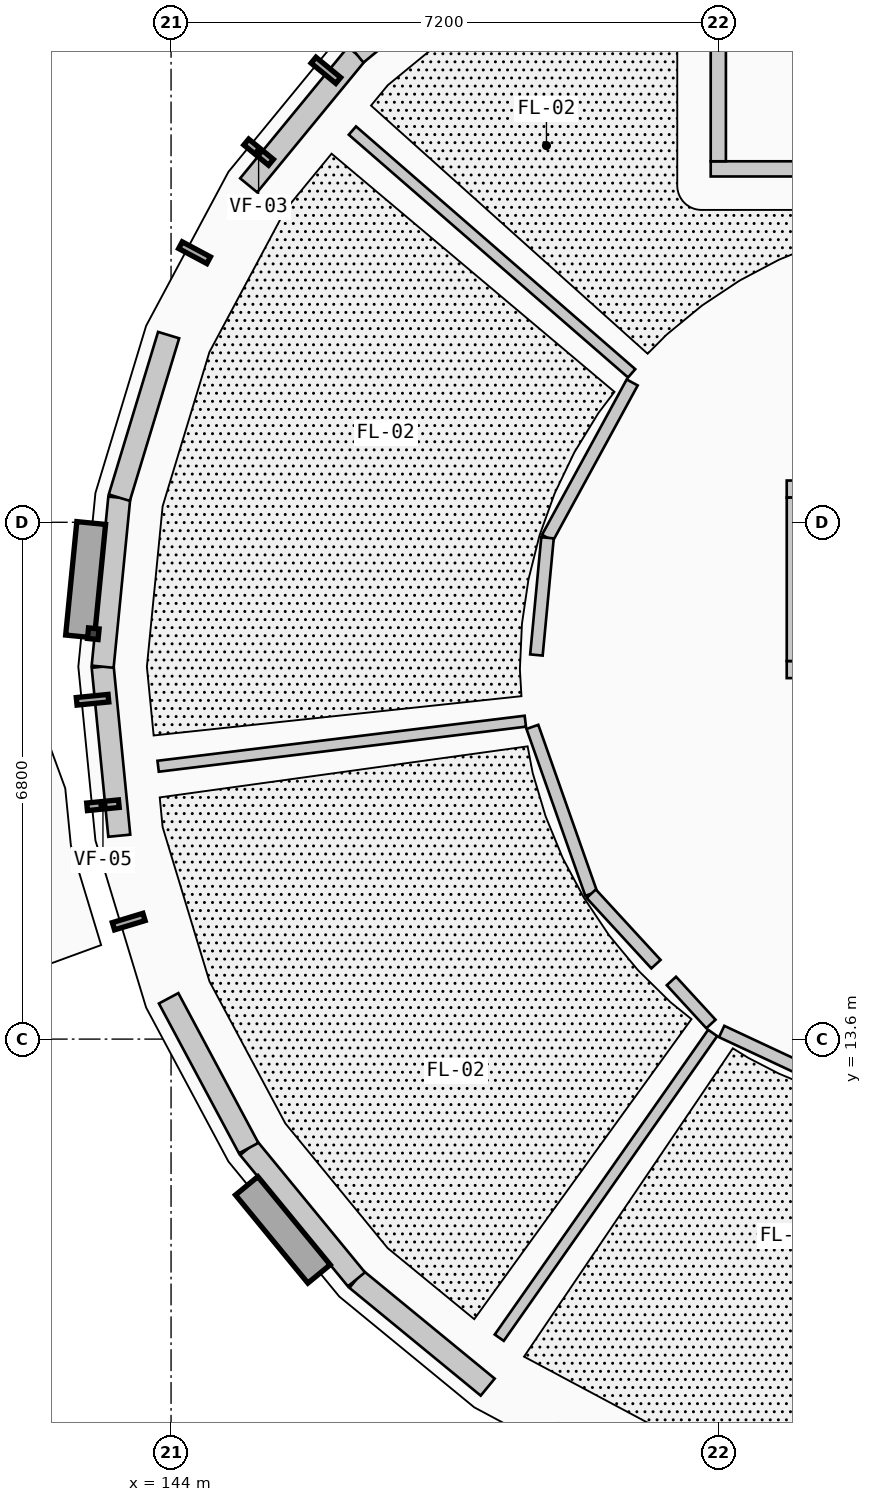
"""IFC4 building model, lengths in metres.
Left out: names, types, materials, properties, quantities, classifications, styles, units other than length and angle.
Written with IfcOpenShell. Run it as: python <this file> out.ifc"""

import sys

from ifc_helpers import new_model, si_unit, direction, frame, frame_2d, origin, origin_2d, place, context, subcontext, project, spatial, rectangle, extrude, element, fill, save


model = new_model("IFC4")
c1 = context("Model", 3, precision=1e-05, world=origin(), true_north=direction((0.0, 1.0)))
c2 = subcontext(c1, "Body", "Model", "MODEL_VIEW")
j1 = project(units=[si_unit("LENGTHUNIT", "METRE"), si_unit("PLANEANGLEUNIT", "RADIAN")], contexts=[c1])
p1 = place(None, origin())
s1 = spatial("IfcSite", under=j1, at=p1, CompositionType="ELEMENT")
p2 = place(p1, origin())
s2 = spatial("IfcBuilding", under=s1, at=p2, CompositionType="ELEMENT")
p3 = place(p2, frame((0.0, 0.0, 4.55)))
s3 = spatial("IfcBuildingStorey", under=s2, at=p3, CompositionType="ELEMENT", Elevation=4.55)
for number, where, z_axis, x_axis in (
    (1, (146.807, 26.193, 0.0), (0.0, 0.0, 1.0), (1.0, 0.0, 0.0)),
    (2, (144.448, 22.664, 0.0), (0.0, 0.0, 1.0), (1.0, 0.0, 0.0)),
    (3, (143.62, 18.5, 0.0), (0.0, 0.0, 1.0), (1.0, 0.0, 0.0)),
    (4, (144.448, 14.336, 0.0), (0.0, 0.0, 1.0), (1.0, 0.0, 0.0)),
    (5, (146.807, 10.807, 0.0), (0.0, 0.0, 1.0), (1.0, 0.0, 0.0)),
    (6, (150.336, 8.448, 0.0), (0.0, 0.0, 1.0), (1.0, 0.0, 0.0)),
    (7, (150.399, 22.601, 0.0), (0.0, 0.0, 1.0), (1.0, 0.0, 0.0)),
    (8, (148.7, 18.5, 0.0), (0.0, 0.0, 1.0), (1.0, 0.0, 0.0)),
    (9, (150.399, 14.399, 0.0), (0.0, 0.0, 1.0), (1.0, 0.0, 0.0)),
):
    element("IfcColumn", number, at=place(p3, frame(where, z_axis=z_axis, x_axis=x_axis)), inside=s3, PredefinedType="COLUMN", context=c2, shape_type="SweptSolid", body=[
        extrude(rectangle(XDim=0.365, YDim=0.365, at=origin_2d()), origin(), (0.0, 0.0, 1.0), 4.2),
    ])
p4 = place(p3, frame((148.166, 9.021, 0.0), z_axis=(0.0, 0.0, 1.0), x_axis=(-0.772875513354, 0.63455767339, 0.0)))
e10 = element("IfcWall", 10, at=p4, inside=s3, PredefinedType="ELEMENTEDWALL", context=c2, shape_type="SweptSolid", body=[
    extrude(rectangle(XDim=2.235, YDim=0.29, at=frame_2d((1.117, 0.0))), origin(), (0.0, 0.0, 1.0), 3.309),
])
p5 = place(p4, frame((0.317, 0.0, 0.85)))
e11 = element("IfcOpeningElement", 11, at=p5, cuts=e10, PredefinedType="OPENING", context=c2, shape_type="SweptSolid", body=[
    extrude(rectangle(XDim=1.6, YDim=1.85, at=frame_2d((0.8, 0.925))), frame((0.0, 0.155, 0.0), z_axis=(0.0, -1.0, 0.0), x_axis=(1.0, 0.0, 0.0)), (0.0, 0.0, 1.0), 0.31),
])
p6 = place(p3, frame((146.439, 10.439, 0.0), z_axis=(0.0, 0.0, 1.0), x_axis=(-0.63455767339, 0.772875513354, 0.0)))
e12 = element("IfcWall", 12, at=p6, inside=s3, PredefinedType="ELEMENTEDWALL", context=c2, shape_type="SweptSolid", body=[
    extrude(rectangle(XDim=2.235, YDim=0.29, at=frame_2d((1.117, 0.0))), origin(), (0.0, 0.0, 1.0), 3.309),
])
p7 = place(p6, frame((0.707, 0.0, 0.85)))
e13 = element("IfcOpeningElement", 13, at=p7, cuts=e12, PredefinedType="OPENING", context=c2, shape_type="SweptSolid", body=[
    extrude(rectangle(XDim=0.82, YDim=1.45, at=frame_2d((0.41, 0.725))), frame((0.0, 0.155, 0.0), z_axis=(0.0, -1.0, 0.0), x_axis=(1.0, 0.0, 0.0)), (0.0, 0.0, 1.0), 0.31),
])
p8 = place(p3, frame((145.021, 12.166, 0.0), z_axis=(0.0, 0.0, 1.0), x_axis=(-0.471217561446, 0.882017012185, 0.0)))
e14 = element("IfcWall", 14, at=p8, inside=s3, PredefinedType="ELEMENTEDWALL", context=c2, shape_type="SweptSolid", body=[
    extrude(rectangle(XDim=2.235, YDim=0.29, at=frame_2d((1.117, 0.0))), origin(), (0.0, 0.0, 1.0), 3.309),
])
p9 = place(p8, frame((0.692, 0.0, 0.85)))
e15 = element("IfcOpeningElement", 15, at=p9, cuts=e14, PredefinedType="OPENING", context=c2, shape_type="SweptSolid", body=[
    extrude(rectangle(XDim=0.85, YDim=1.5, at=frame_2d((0.425, 0.75))), frame((0.0, 0.155, 0.0), z_axis=(0.0, -1.0, 0.0), x_axis=(1.0, 0.0, 0.0)), (0.0, 0.0, 1.0), 0.31),
])
p10 = place(p3, frame((143.319, 16.276, 0.0), z_axis=(0.0, 0.0, 1.0), x_axis=(-0.097989369151, 0.995187461503, 0.0)))
e16 = element("IfcWall", 16, at=p10, inside=s3, PredefinedType="ELEMENTEDWALL", context=c2, shape_type="SweptSolid", body=[
    extrude(rectangle(XDim=2.235, YDim=0.29, at=frame_2d((1.117, 0.0))), origin(), (0.0, 0.0, 1.0), 3.309),
])
p11 = place(p10, frame((0.692, 0.0, 0.85)))
e17 = element("IfcOpeningElement", 17, at=p11, cuts=e16, PredefinedType="OPENING", context=c2, shape_type="SweptSolid", body=[
    extrude(rectangle(XDim=0.85, YDim=1.75, at=frame_2d((0.425, 0.875))), frame((0.0, 0.155, 0.0), z_axis=(0.0, -1.0, 0.0), x_axis=(1.0, 0.0, 0.0)), (0.0, 0.0, 1.0), 0.31),
])
p12 = place(p3, frame((143.1, 18.5, 0.0), z_axis=(0.0, 0.0, 1.0), x_axis=(0.097989369151, 0.995187461503, 0.0)))
e18 = element("IfcWall", 18, at=p12, inside=s3, PredefinedType="ELEMENTEDWALL", context=c2, shape_type="SweptSolid", body=[
    extrude(rectangle(XDim=2.235, YDim=0.29, at=frame_2d((1.117, 0.0))), origin(), (0.0, 0.0, 1.0), 3.309),
])
p13 = place(p12, frame((0.677, 0.0, 0.85)))
e19 = element("IfcOpeningElement", 19, at=p13, cuts=e18, PredefinedType="OPENING", context=c2, shape_type="SweptSolid", body=[
    extrude(rectangle(XDim=0.88, YDim=1.6, at=frame_2d((0.44, 0.8))), frame((0.0, 0.155, 0.0), z_axis=(0.0, -1.0, 0.0), x_axis=(1.0, 0.0, 0.0)), (0.0, 0.0, 1.0), 0.31),
])
p14 = place(p3, frame((143.319, 20.724, 0.0), z_axis=(0.0, 0.0, 1.0), x_axis=(0.290322655883, 0.956928814218, 0.0)))
e20 = element("IfcWall", 20, at=p14, inside=s3, PredefinedType="ELEMENTEDWALL", context=c2, shape_type="SweptSolid", body=[
    extrude(rectangle(XDim=2.235, YDim=0.29, at=frame_2d((1.118, 0.0))), origin(), (0.0, 0.0, 1.0), 3.309),
])
p15 = place(p14, frame((0.668, 0.0, 0.85)))
e21 = element("IfcOpeningElement", 21, at=p15, cuts=e20, PredefinedType="OPENING", context=c2, shape_type="SweptSolid", body=[
    extrude(rectangle(XDim=0.9, YDim=1.4, at=frame_2d((0.45, 0.7))), frame((0.0, 0.155, 0.0), z_axis=(0.0, -1.0, 0.0), x_axis=(1.0, 0.0, 0.0)), (0.0, 0.0, 1.0), 0.31),
])
p16 = place(p3, frame((145.021, 24.834, 0.0), z_axis=(0.0, 0.0, 1.0), x_axis=(0.63455767339, 0.772875513354, 0.0)))
e22 = element("IfcWall", 22, at=p16, inside=s3, PredefinedType="ELEMENTEDWALL", context=c2, shape_type="SweptSolid", body=[
    extrude(rectangle(XDim=2.235, YDim=0.29, at=frame_2d((1.117, 0.0))), origin(), (0.0, 0.0, 1.0), 3.309),
])
p17 = place(p16, frame((0.667, 0.0, 0.85)))
e23 = element("IfcOpeningElement", 23, at=p17, cuts=e22, PredefinedType="OPENING", context=c2, shape_type="SweptSolid", body=[
    extrude(rectangle(XDim=0.9, YDim=1.65, at=frame_2d((0.45, 0.825))), frame((0.0, 0.155, 0.0), z_axis=(0.0, -1.0, 0.0), x_axis=(1.0, 0.0, 0.0)), (0.0, 0.0, 1.0), 0.31),
])
p18 = place(p3, frame((146.439, 26.561, 0.0), z_axis=(0.0, 0.0, 1.0), x_axis=(0.772875513354, 0.63455767339, 0.0)))
e24 = element("IfcWall", 24, at=p18, inside=s3, PredefinedType="ELEMENTEDWALL", context=c2, shape_type="SweptSolid", body=[
    extrude(rectangle(XDim=2.235, YDim=0.29, at=frame_2d((1.117, 0.0))), origin(), (0.0, 0.0, 1.0), 3.309),
])
p19 = place(p18, frame((0.667, 0.0, 0.85)))
e25 = element("IfcOpeningElement", 25, at=p19, cuts=e24, PredefinedType="OPENING", context=c2, shape_type="SweptSolid", body=[
    extrude(rectangle(XDim=0.9, YDim=1.9, at=frame_2d((0.45, 0.95))), frame((0.0, 0.155, 0.0), z_axis=(0.0, -1.0, 0.0), x_axis=(1.0, 0.0, 0.0)), (0.0, 0.0, 1.0), 0.31),
])
p20 = place(p3, frame((151.1, 25.05, 0.0), z_axis=(0.0, 0.0, 1.0), x_axis=(1.0, 0.0, 0.0)))
e26 = element("IfcWall", 26, at=p20, inside=s3, PredefinedType="SHEAR", context=c2, shape_type="SweptSolid", body=[
    extrude(rectangle(XDim=6.8, YDim=0.2, at=frame_2d((3.4, 0.0))), origin(), (0.0, 0.0, 1.0), 3.955),
])
p21 = place(p20, frame((0.38, 0.0, 0.0)))
e27 = element("IfcOpeningElement", 27, at=p21, cuts=e26, PredefinedType="OPENING", context=c2, shape_type="SweptSolid", body=[
    extrude(rectangle(XDim=1.05, YDim=2.15, at=frame_2d((0.525, 1.075))), frame((0.0, 0.11, 0.0), z_axis=(0.0, -1.0, 0.0), x_axis=(1.0, 0.0, 0.0)), (0.0, 0.0, 1.0), 0.22),
])
p22 = place(p3, frame((151.2, 25.15, 0.0), z_axis=(0.0, 0.0, 1.0), x_axis=(0.0, 1.0, 0.0)))
e28 = element("IfcWall", 28, at=p22, inside=s3, PredefinedType="SHEAR", context=c2, shape_type="SweptSolid", body=[
    extrude(rectangle(XDim=2.9, YDim=0.2, at=frame_2d((1.45, 0.0))), origin(), (0.0, 0.0, 1.0), 3.955),
])
p23 = place(p3, frame((152.1, 18.462, 0.0), z_axis=(0.0, 0.0, 1.0), x_axis=(1.0, 0.0, 0.0)))
e29 = element("IfcWall", 29, at=p23, inside=s3, PredefinedType="SHEAR", context=c2, shape_type="SweptSolid", body=[
    extrude(rectangle(XDim=3.1, YDim=0.225, at=frame_2d((1.55, 0.0))), origin(), (0.0, 0.0, 1.0), 3.955),
])
p24 = place(p23, frame((0.95, 0.0, 0.0)))
e30 = element("IfcOpeningElement", 30, at=p24, cuts=e29, PredefinedType="OPENING", context=c2, shape_type="SweptSolid", body=[
    extrude(rectangle(XDim=1.2, YDim=2.2, at=frame_2d((0.6, 1.1))), frame((0.0, 0.123, 0.0), z_axis=(0.0, -1.0, 0.0), x_axis=(1.0, 0.0, 0.0)), (0.0, 0.0, 1.0), 0.245),
])
p25 = place(p3, frame((152.1, 20.837, 0.0), z_axis=(0.0, 0.0, 1.0), x_axis=(1.0, 0.0, 0.0)))
e31 = element("IfcWall", 31, at=p25, inside=s3, PredefinedType="SHEAR", context=c2, shape_type="SweptSolid", body=[
    extrude(rectangle(XDim=3.1, YDim=0.225, at=frame_2d((1.55, 0.0))), origin(), (0.0, 0.0, 1.0), 3.955),
])
p26 = place(p3, frame((152.213, 18.575, 0.0), z_axis=(0.0, 0.0, 1.0), x_axis=(0.0, 1.0, 0.0)))
e32 = element("IfcWall", 32, at=p26, inside=s3, PredefinedType="SHEAR", context=c2, shape_type="SweptSolid", body=[
    extrude(rectangle(XDim=2.15, YDim=0.225, at=frame_2d((1.075, 0.0))), origin(), (0.0, 0.0, 1.0), 3.955),
])
p27 = place(p3, frame((150.06, 22.36, 0.0), z_axis=(0.0, 0.0, 1.0), x_axis=(-0.754707000712, 0.656061996366, 0.0)))
e33 = element("IfcWall", 33, at=p27, inside=s3, PredefinedType="PARTITIONING", context=c2, shape_type="SweptSolid", body=[
    extrude(rectangle(XDim=4.868, YDim=0.145, at=frame_2d((2.434, 0.0))), origin(), (0.0, 0.0, 1.0), 3.284),
])
p28 = place(p3, frame((148.661, 17.783, 0.0), z_axis=(0.0, 0.0, 1.0), x_axis=(-0.992549416304, -0.121842751918, 0.0)))
e34 = element("IfcWall", 34, at=p28, inside=s3, PredefinedType="PARTITIONING", context=c2, shape_type="SweptSolid", body=[
    extrude(rectangle(XDim=4.867, YDim=0.145, at=frame_2d((2.434, 0.0))), origin(), (0.0, 0.0, 1.0), 3.284),
])
p29 = place(p3, frame((151.126, 13.681, 0.0), z_axis=(0.0, 0.0, 1.0), x_axis=(-0.573579487823, -0.819149907617, 0.0)))
e35 = element("IfcWall", 35, at=p29, inside=s3, PredefinedType="PARTITIONING", context=c2, shape_type="SweptSolid", body=[
    extrude(rectangle(XDim=4.895, YDim=0.145, at=frame_2d((2.448, 0.0))), origin(), (0.0, 0.0, 1.0), 3.284),
])
p30 = place(p3, frame((150.067, 22.24, 0.0), z_axis=(0.0, 0.0, 1.0), x_axis=(-0.478565523384, -0.878051843474, 0.0)))
e36 = element("IfcWall", 36, at=p30, inside=s3, PredefinedType="PARTITIONING", context=c2, shape_type="SweptSolid", body=[
    extrude(rectangle(XDim=2.328, YDim=0.165, at=frame_2d((1.164, 0.0))), origin(), (0.0, 0.0, 1.0), 3.284),
])
p31 = place(p30, frame((0.579, 0.0, 0.0)))
e37 = element("IfcOpeningElement", 37, at=p31, cuts=e36, PredefinedType="OPENING", context=c2, shape_type="SweptSolid", body=[
    extrude(rectangle(XDim=1.17, YDim=2.24, at=frame_2d((0.585, 1.12))), frame((0.0, 0.093, 0.0), z_axis=(0.0, -1.0, 0.0), x_axis=(1.0, 0.0, 0.0)), (0.0, 0.0, 1.0), 0.185),
])
p32 = place(p3, frame((148.953, 20.196, 0.0), z_axis=(0.0, 0.0, 1.0), x_axis=(-0.094258636882, -0.995547743392, 0.0)))
e38 = element("IfcWall", 38, at=p32, inside=s3, PredefinedType="PARTITIONING", context=c2, shape_type="SweptSolid", body=[
    extrude(rectangle(XDim=1.549, YDim=0.165, at=frame_2d((0.774, 0.0))), origin(), (0.0, 0.0, 1.0), 3.284),
])
p33 = place(p3, frame((148.754, 17.708, 0.0), z_axis=(0.0, 0.0, 1.0), x_axis=(0.332606133603, -0.943065830093, 0.0)))
e39 = element("IfcWall", 39, at=p33, inside=s3, PredefinedType="PARTITIONING", context=c2, shape_type="SweptSolid", body=[
    extrude(rectangle(XDim=2.328, YDim=0.165, at=frame_2d((1.164, 0.0))), origin(), (0.0, 0.0, 1.0), 3.284),
])
p34 = place(p33, frame((0.569, 0.0, 0.0)))
e40 = element("IfcOpeningElement", 40, at=p34, cuts=e39, PredefinedType="OPENING", context=c2, shape_type="SweptSolid", body=[
    extrude(rectangle(XDim=1.19, YDim=2.26, at=frame_2d((0.595, 1.13))), frame((0.0, 0.093, 0.0), z_axis=(0.0, -1.0, 0.0), x_axis=(1.0, 0.0, 0.0)), (0.0, 0.0, 1.0), 0.185),
])
p35 = place(p3, frame((149.528, 15.513, 0.0), z_axis=(0.0, 0.0, 1.0), x_axis=(0.676611080709, -0.736340577085, 0.0)))
e41 = element("IfcWall", 41, at=p35, inside=s3, PredefinedType="PARTITIONING", context=c2, shape_type="SweptSolid", body=[
    extrude(rectangle(XDim=1.259, YDim=0.165, at=frame_2d((0.629, 0.0))), origin(), (0.0, 0.0, 1.0), 3.284),
])
p36 = place(p3, frame((150.583, 14.365, 0.0), z_axis=(0.0, 0.0, 1.0), x_axis=(0.676615979647, -0.736336075503, 0.0)))
e42 = element("IfcWall", 42, at=p36, inside=s3, PredefinedType="PARTITIONING", context=c2, shape_type="SweptSolid", body=[
    extrude(rectangle(XDim=0.769, YDim=0.165, at=frame_2d((0.384, 0.0))), origin(), (0.0, 0.0, 1.0), 3.284),
])
p37 = place(p3, frame((151.244, 13.7, 0.0), z_axis=(0.0, 0.0, 1.0), x_axis=(0.905838456469, -0.423623288763, 0.0)))
e43 = element("IfcWall", 43, at=p37, inside=s3, PredefinedType="PARTITIONING", context=c2, shape_type="SweptSolid", body=[
    extrude(rectangle(XDim=1.829, YDim=0.165, at=frame_2d((0.915, 0.0))), origin(), (0.0, 0.0, 1.0), 3.284),
])
p38 = place(p37, frame((0.31, 0.0, 0.0)))
e44 = element("IfcOpeningElement", 44, at=p38, cuts=e43, PredefinedType="OPENING", context=c2, shape_type="SweptSolid", body=[
    extrude(rectangle(XDim=1.21, YDim=2.16, at=frame_2d((0.605, 1.08))), frame((0.0, 0.093, 0.0), z_axis=(0.0, -1.0, 0.0), x_axis=(1.0, 0.0, 0.0)), (0.0, 0.0, 1.0), 0.185),
])
p39 = place(p5, origin())
e45 = element("IfcWindow", 45, at=p39, inside=s3, PartitioningType="SINGLE_PANEL", PredefinedType="WINDOW", context=c2, shape_type="SweptSolid", body=[
    extrude(rectangle(XDim=1.6, YDim=1.85, at=frame_2d((0.8, 0.925))), frame((0.0, 0.03, 0.0), z_axis=(0.0, -1.0, 0.0), x_axis=(1.0, 0.0, 0.0)), (0.0, 0.0, 1.0), 0.06),
])
fill(e11, e45)
p40 = place(p7, origin())
e46 = element("IfcWindow", 46, at=p40, inside=s3, PartitioningType="SINGLE_PANEL", PredefinedType="WINDOW", context=c2, shape_type="SweptSolid", body=[
    extrude(rectangle(XDim=0.82, YDim=1.45, at=frame_2d((0.41, 0.725))), frame((0.0, 0.03, 0.0), z_axis=(0.0, -1.0, 0.0), x_axis=(1.0, 0.0, 0.0)), (0.0, 0.0, 1.0), 0.06),
])
fill(e13, e46)
p41 = place(p9, origin())
e47 = element("IfcWindow", 47, at=p41, inside=s3, PartitioningType="SINGLE_PANEL", PredefinedType="WINDOW", context=c2, shape_type="SweptSolid", body=[
    extrude(rectangle(XDim=0.85, YDim=1.5, at=frame_2d((0.425, 0.75))), frame((0.0, 0.03, 0.0), z_axis=(0.0, -1.0, 0.0), x_axis=(1.0, 0.0, 0.0)), (0.0, 0.0, 1.0), 0.06),
])
fill(e15, e47)
p42 = place(p11, origin())
e48 = element("IfcWindow", 48, at=p42, inside=s3, PartitioningType="SINGLE_PANEL", PredefinedType="WINDOW", context=c2, shape_type="SweptSolid", body=[
    extrude(rectangle(XDim=0.85, YDim=1.75, at=frame_2d((0.425, 0.875))), frame((0.0, 0.03, 0.0), z_axis=(0.0, -1.0, 0.0), x_axis=(1.0, 0.0, 0.0)), (0.0, 0.0, 1.0), 0.06),
])
fill(e17, e48)
p43 = place(p13, origin())
e49 = element("IfcWindow", 49, at=p43, inside=s3, PartitioningType="SINGLE_PANEL", PredefinedType="WINDOW", context=c2, shape_type="SweptSolid", body=[
    extrude(rectangle(XDim=0.88, YDim=1.6, at=frame_2d((0.44, 0.8))), frame((0.0, 0.03, 0.0), z_axis=(0.0, -1.0, 0.0), x_axis=(1.0, 0.0, 0.0)), (0.0, 0.0, 1.0), 0.06),
])
fill(e19, e49)
p44 = place(p15, origin())
e50 = element("IfcWindow", 50, at=p44, inside=s3, PartitioningType="SINGLE_PANEL", PredefinedType="WINDOW", context=c2, shape_type="SweptSolid", body=[
    extrude(rectangle(XDim=0.9, YDim=1.4, at=frame_2d((0.45, 0.7))), frame((0.0, 0.03, 0.0), z_axis=(0.0, -1.0, 0.0), x_axis=(1.0, 0.0, 0.0)), (0.0, 0.0, 1.0), 0.06),
])
fill(e21, e50)
p45 = place(p17, origin())
e51 = element("IfcWindow", 51, at=p45, inside=s3, PartitioningType="SINGLE_PANEL", PredefinedType="WINDOW", context=c2, shape_type="SweptSolid", body=[
    extrude(rectangle(XDim=0.9, YDim=1.65, at=frame_2d((0.45, 0.825))), frame((0.0, 0.03, 0.0), z_axis=(0.0, -1.0, 0.0), x_axis=(1.0, 0.0, 0.0)), (0.0, 0.0, 1.0), 0.06),
])
fill(e23, e51)
p46 = place(p21, origin())
e52 = element("IfcDoor", 52, at=p46, inside=s3, OperationType="SINGLE_SWING_LEFT", PredefinedType="DOOR", context=c2, shape_type="SweptSolid", body=[
    extrude(rectangle(XDim=1.05, YDim=2.15, at=frame_2d((0.525, 1.075))), frame((0.0, 0.025, 0.0), z_axis=(0.0, -1.0, 0.0), x_axis=(1.0, 0.0, 0.0)), (0.0, 0.0, 1.0), 0.05),
])
fill(e27, e52)
p47 = place(p31, origin())
e53 = element("IfcDoor", 53, at=p47, inside=s3, OperationType="SINGLE_SWING_RIGHT", PredefinedType="DOOR", context=c2, shape_type="SweptSolid", body=[
    extrude(rectangle(XDim=1.17, YDim=2.24, at=frame_2d((0.585, 1.12))), frame((0.0, 0.025, 0.0), z_axis=(0.0, -1.0, 0.0), x_axis=(1.0, 0.0, 0.0)), (0.0, 0.0, 1.0), 0.05),
])
fill(e37, e53)
p48 = place(p34, origin())
e54 = element("IfcDoor", 54, at=p48, inside=s3, OperationType="SINGLE_SWING_LEFT", PredefinedType="DOOR", context=c2, shape_type="SweptSolid", body=[
    extrude(rectangle(XDim=1.19, YDim=2.26, at=frame_2d((0.595, 1.13))), frame((0.0, 0.025, 0.0), z_axis=(0.0, -1.0, 0.0), x_axis=(1.0, 0.0, 0.0)), (0.0, 0.0, 1.0), 0.05),
])
fill(e40, e54)
p49 = place(p38, origin())
e55 = element("IfcDoor", 55, at=p49, inside=s3, OperationType="SINGLE_SWING_RIGHT", PredefinedType="DOOR", context=c2, shape_type="SweptSolid", body=[
    extrude(rectangle(XDim=1.21, YDim=2.16, at=frame_2d((0.605, 1.08))), frame((0.0, 0.025, 0.0), z_axis=(0.0, -1.0, 0.0), x_axis=(1.0, 0.0, 0.0)), (0.0, 0.0, 1.0), 0.05),
])
fill(e44, e55)
save(model, sys.argv[1])
